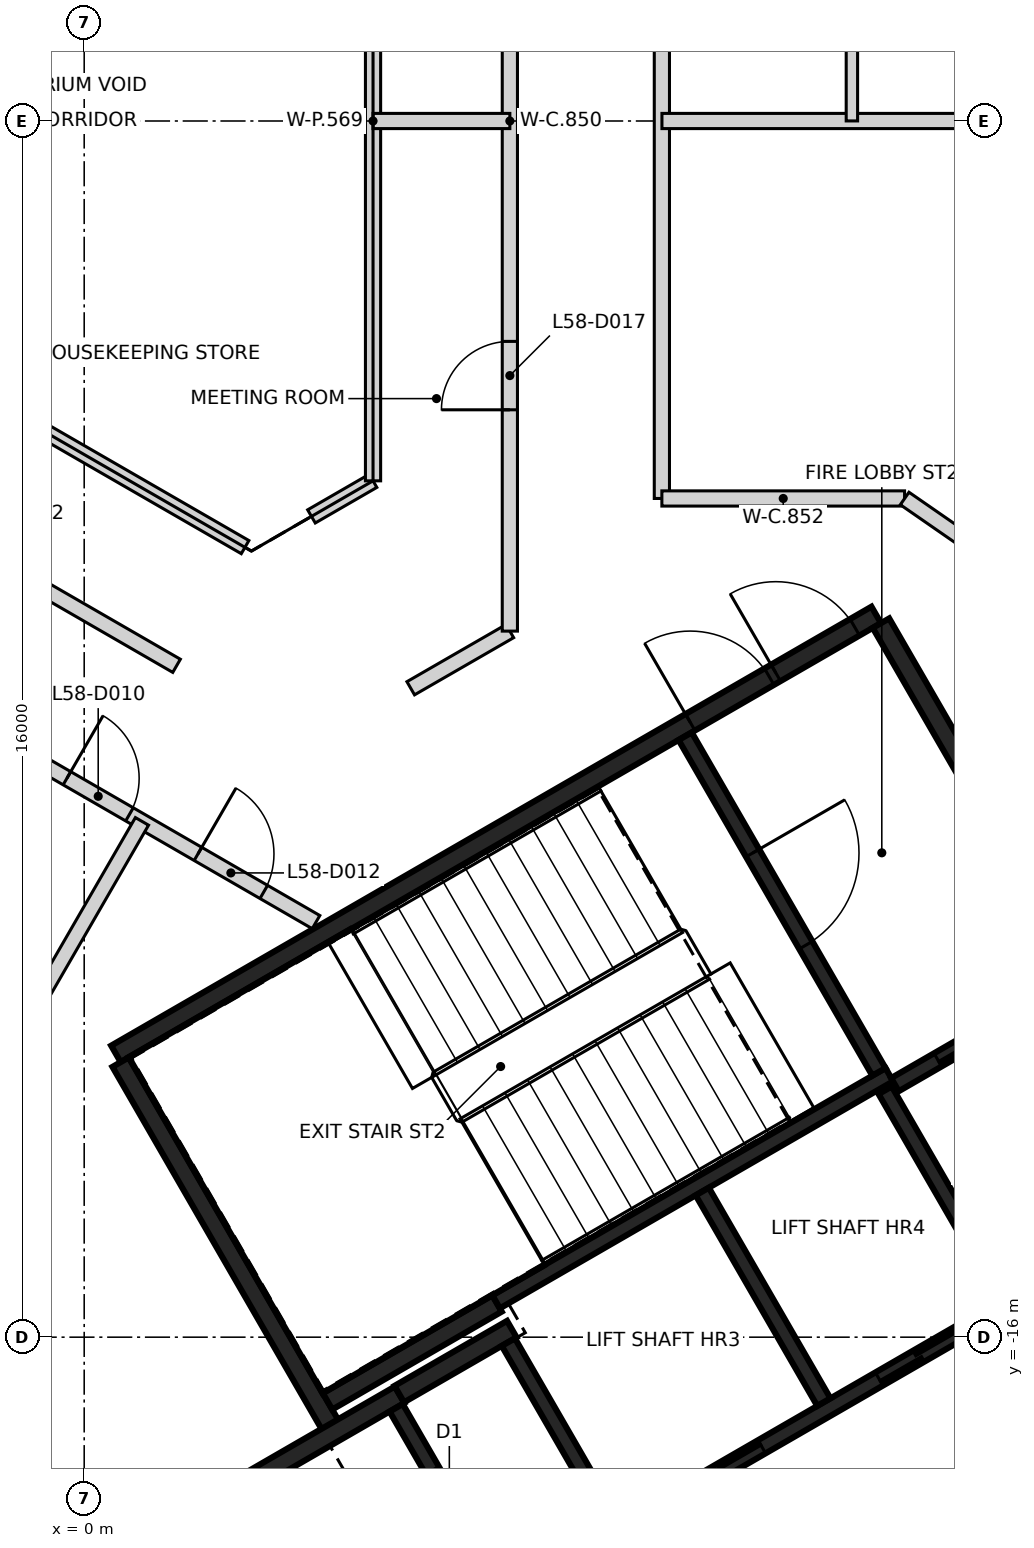
"""IFC4 building model, lengths in metres.
Left out: names, types, materials, properties, quantities, classifications, styles, units other than length and angle.
Written with IfcOpenShell. Run it as: python <this file> out.ifc"""

import sys

from ifc_helpers import new_model, si_unit, direction, frame, frame_2d, origin, place, context, subcontext, project, spatial, rectangle, extrude, element, fill, save


model = new_model("IFC4")
c1 = context("Model", 3, precision=1e-05, world=origin(), true_north=direction((0.0, 1.0)))
c2 = subcontext(c1, "Body", "Model", "MODEL_VIEW")
j1 = project(units=[si_unit("LENGTHUNIT", "METRE"), si_unit("PLANEANGLEUNIT", "RADIAN")], contexts=[c1])
p1 = place(None, origin())
s1 = spatial("IfcSite", under=j1, at=p1, CompositionType="ELEMENT")
p2 = place(p1, origin())
s2 = spatial("IfcBuilding", under=s1, at=p2, CompositionType="ELEMENT")
p3 = place(p2, frame((0.0, 0.0, 232.2)))
s3 = spatial("IfcBuildingStorey", under=s2, at=p3, CompositionType="ELEMENT", Elevation=232.2)
p4 = place(p3, frame((0.417, -12.273, 0.0), z_axis=(0.0, 0.0, 1.0), x_axis=(0.866021906294, 0.500006057782, 0.0)))
e1 = element("IfcWall", 1, at=p4, inside=s3, PredefinedType="SHEAR", context=c2, shape_type="SweptSolid", body=[
    extrude(rectangle(XDim=11.55, YDim=0.25, at=frame_2d((5.775, 0.0))), origin(), (0.0, 0.0, 1.0), 3.25),
])
p5 = place(p4, frame((10.025, 0.0, 0.0)))
e2 = element("IfcOpeningElement", 2, at=p5, cuts=e1, PredefinedType="OPENING", context=c2, shape_type="SweptSolid", body=[
    extrude(rectangle(XDim=1.2, YDim=2.1, at=frame_2d((0.6, 1.05))), frame((0.0, 0.135, 0.0), z_axis=(0.0, -1.0, 0.0), x_axis=(1.0, 0.0, 0.0)), (0.0, 0.0, 1.0), 0.27),
])
p6 = place(p4, frame((8.725, 0.0, 0.0)))
e3 = element("IfcOpeningElement", 3, at=p6, cuts=e1, PredefinedType="OPENING", context=c2, shape_type="SweptSolid", body=[
    extrude(rectangle(XDim=1.2, YDim=2.1, at=frame_2d((0.6, 1.05))), frame((0.0, 0.135, 0.0), z_axis=(0.0, -1.0, 0.0), x_axis=(1.0, 0.0, 0.0)), (0.0, 0.0, 1.0), 0.27),
])
p7 = place(p3, frame((16.133, -16.594, 0.0), z_axis=(0.0, 0.0, 1.0), x_axis=(-0.866022959057, -0.500004234368, 0.0)))
e4 = element("IfcWall", 4, at=p7, inside=s3, PredefinedType="SHEAR", context=c2, shape_type="SweptSolid", body=[
    extrude(rectangle(XDim=8.75, YDim=0.25, at=frame_2d((4.375, 0.0))), origin(), (0.0, 0.0, 1.0), 3.25),
])
p8 = place(p3, frame((3.235, -17.153, 0.0), z_axis=(0.0, 0.0, 1.0), x_axis=(-0.500008851346, 0.866020293397, 0.0)))
e5 = element("IfcWall", 5, at=p8, inside=s3, PredefinedType="SHEAR", context=c2, shape_type="SweptSolid", body=[
    extrude(rectangle(XDim=5.51, YDim=0.25, at=frame_2d((2.755, 0.0))), origin(), (0.0, 0.0, 1.0), 3.25),
])
p9 = place(p3, frame((10.483, -6.606, 0.0), z_axis=(0.0, 0.0, 1.0), x_axis=(0.49999885962, -0.866026062182, 0.0)))
e6 = element("IfcWall", 6, at=p9, inside=s3, PredefinedType="SHEAR", context=c2, shape_type="SweptSolid", body=[
    extrude(rectangle(XDim=5.225, YDim=0.25, at=frame_2d((2.612, 0.0))), origin(), (0.0, 0.0, 1.0), 3.25),
])
p10 = place(p3, frame((1.669, -18.19, 0.0), z_axis=(0.0, 0.0, 1.0), x_axis=(0.866042235819, 0.499970844928, 0.0)))
e7 = element("IfcWall", 7, at=p10, inside=s3, PredefinedType="SHEAR", context=c2, shape_type="SweptSolid", body=[
    extrude(rectangle(XDim=2.865, YDim=0.25, at=frame_2d((1.432, 0.0))), origin(), (0.0, 0.0, 1.0), 3.25),
])
p11 = place(p3, frame((5.431, -15.556, 0.0), z_axis=(0.0, 0.0, 1.0), x_axis=(-0.866022940537, -0.500004266446, 0.0)))
e8 = element("IfcWall", 8, at=p11, inside=s3, PredefinedType="SHEAR", context=c2, shape_type="SweptSolid", body=[
    extrude(rectangle(XDim=2.575, YDim=0.25, at=frame_2d((1.287, 0.0))), origin(), (0.0, 0.0, 1.0), 3.25),
])
p12 = place(p3, frame((4.145, -16.749, 0.0), z_axis=(0.0, 0.0, 1.0), x_axis=(0.866038183914, 0.499977863513, 0.0)))
e9 = element("IfcWall", 9, at=p12, inside=s3, PredefinedType="SHEAR", context=c2, shape_type="SweptSolid", body=[
    extrude(rectangle(XDim=1.71, YDim=0.25, at=frame_2d((0.855, 0.0))), origin(), (0.0, 0.0, 1.0), 3.25),
])
p13 = place(p3, frame((5.419, -15.534, 0.0), z_axis=(0.0, 0.0, 1.0), x_axis=(0.866029065029, 0.499993658486, 0.0)))
e10 = element("IfcWall", 10, at=p13, inside=s3, PredefinedType="SHEAR", context=c2, shape_type="SweptSolid", body=[
    extrude(rectangle(XDim=5.974, YDim=0.2, at=frame_2d((2.987, 0.0))), origin(), (0.0, 0.0, 1.0), 3.25),
])
p14 = place(p3, frame((7.01, -18.542, 0.0), z_axis=(0.0, 0.0, 1.0), x_axis=(0.866030299012, 0.499991521122, 0.0)))
e11 = element("IfcWall", 11, at=p14, inside=s3, PredefinedType="SHEAR", context=c2, shape_type="SweptSolid", body=[
    extrude(rectangle(XDim=6.1, YDim=0.2, at=frame_2d((3.05, 0.0))), origin(), (0.0, 0.0, 1.0), 3.25),
])
p15 = place(p14, frame((1.0, 0.0, 0.0)))
e12 = element("IfcOpeningElement", 12, at=p15, cuts=e11, PredefinedType="OPENING", context=c2, shape_type="SweptSolid", body=[
    extrude(rectangle(XDim=1.2, YDim=2.1, at=frame_2d((0.6, 1.05))), frame((0.0, 0.11, 0.0), z_axis=(0.0, -1.0, 0.0), x_axis=(1.0, 0.0, 0.0)), (0.0, 0.0, 1.0), 0.22),
])
p16 = place(p14, frame((3.982, 0.0, 0.0)))
e13 = element("IfcOpeningElement", 13, at=p16, cuts=e11, PredefinedType="OPENING", context=c2, shape_type="SweptSolid", body=[
    extrude(rectangle(XDim=1.2, YDim=2.1, at=frame_2d((0.6, 1.05))), frame((0.0, 0.11, 0.0), z_axis=(0.0, -1.0, 0.0), x_axis=(1.0, 0.0, 0.0)), (0.0, 0.0, 1.0), 0.22),
])
p17 = place(p3, frame((7.906, -8.094, 0.0), z_axis=(0.0, 0.0, 1.0), x_axis=(0.500027839223, -0.866009330205, 0.0)))
e14 = element("IfcWall", 14, at=p17, inside=s3, PredefinedType="SHEAR", context=c2, shape_type="SweptSolid", body=[
    extrude(rectangle(XDim=5.098, YDim=0.2, at=frame_2d((2.549, 0.0))), origin(), (0.0, 0.0, 1.0), 3.25),
])
p18 = place(p17, frame((1.774, 0.0, 0.0)))
e15 = element("IfcOpeningElement", 15, at=p18, cuts=e14, PredefinedType="OPENING", context=c2, shape_type="SweptSolid", body=[
    extrude(rectangle(XDim=1.4, YDim=2.1, at=frame_2d((0.7, 1.05))), frame((0.0, 0.11, 0.0), z_axis=(0.0, -1.0, 0.0), x_axis=(1.0, 0.0, 0.0)), (0.0, 0.0, 1.0), 0.22),
])
p19 = place(p3, frame((8.132, -14.084, 0.0), z_axis=(0.0, 0.0, 1.0), x_axis=(0.499997778408, -0.866026686418, 0.0)))
e16 = element("IfcWall", 16, at=p19, inside=s3, PredefinedType="SHEAR", context=c2, shape_type="SweptSolid", body=[
    extrude(rectangle(XDim=3.198, YDim=0.2, at=frame_2d((1.599, 0.0))), origin(), (0.0, 0.0, 1.0), 3.25),
])
p20 = place(p3, frame((5.503, -19.352, 0.0), z_axis=(0.0, 0.0, 1.0), x_axis=(-0.499986818241, 0.866033014143, 0.0)))
e17 = element("IfcWall", 17, at=p20, inside=s3, PredefinedType="SHEAR", context=c2, shape_type="SweptSolid", body=[
    extrude(rectangle(XDim=2.798, YDim=0.2, at=frame_2d((1.399, 0.0))), origin(), (0.0, 0.0, 1.0), 3.25),
])
p21 = place(p20, frame((0.949, 0.0, 0.0)))
e18 = element("IfcOpeningElement", 18, at=p21, cuts=e17, PredefinedType="OPENING", context=c2, shape_type="SweptSolid", body=[
    extrude(rectangle(XDim=0.9, YDim=2.1, at=frame_2d((0.45, 1.05))), frame((0.0, 0.11, 0.0), z_axis=(0.0, -1.0, 0.0), x_axis=(1.0, 0.0, 0.0)), (0.0, 0.0, 1.0), 0.22),
])
p22 = place(p3, frame((6.96, -18.455, 0.0), z_axis=(0.0, 0.0, 1.0), x_axis=(-0.499926705758, 0.866067716099, 0.0)))
e19 = element("IfcWall", 19, at=p22, inside=s3, PredefinedType="SHEAR", context=c2, shape_type="SweptSolid", body=[
    extrude(rectangle(XDim=2.759, YDim=0.2, at=frame_2d((1.38, 0.0))), origin(), (0.0, 0.0, 1.0), 3.25),
])
p23 = place(p3, frame((12.088, -15.437, 0.0), z_axis=(0.0, 0.0, 1.0), x_axis=(-0.500026960575, 0.86600983753, 0.0)))
e20 = element("IfcWall", 20, at=p23, inside=s3, PredefinedType="SHEAR", context=c2, shape_type="SweptSolid", body=[
    extrude(rectangle(XDim=3.1, YDim=0.2, at=frame_2d((1.55, 0.0))), origin(), (0.0, 0.0, 1.0), 3.25),
])
p24 = place(p3, frame((10.666, -12.678, 0.0), z_axis=(0.0, 0.0, 1.0), x_axis=(0.866018407898, 0.500012117035, 0.0)))
e21 = element("IfcWall", 21, at=p24, inside=s3, PredefinedType="SHEAR", context=c2, shape_type="SweptSolid", body=[
    extrude(rectangle(XDim=2.651, YDim=0.2, at=frame_2d((1.325, 0.0))), origin(), (0.0, 0.0, 1.0), 3.25),
])
p25 = place(p24, frame((0.652, 0.0, 0.0)))
e22 = element("IfcOpeningElement", 22, at=p25, cuts=e21, PredefinedType="OPENING", context=c2, shape_type="SweptSolid", body=[
    extrude(rectangle(XDim=1.3, YDim=2.1, at=frame_2d((0.65, 1.05))), frame((0.0, 0.11, 0.0), z_axis=(0.0, -1.0, 0.0), x_axis=(1.0, 0.0, 0.0)), (0.0, 0.0, 1.0), 0.22),
])
p26 = place(p3, frame((-8.612, -1.494, 0.0), z_axis=(0.0, 0.0, 1.0), x_axis=(0.866035468681, -0.499982566683, 0.0)))
e23 = element("IfcWall", 23, at=p26, inside=s3, PredefinedType="PARTITIONING", context=c2, shape_type="SweptSolid", body=[
    extrude(rectangle(XDim=11.348, YDim=0.2, at=frame_2d((5.674, 0.0))), origin(), (0.0, 0.0, 1.0), 3.25),
])
p27 = place(p26, frame((1.241, 0.0, 0.0)))
e24 = element("IfcOpeningElement", 24, at=p27, cuts=e23, PredefinedType="OPENING", context=c2, shape_type="SweptSolid", body=[
    extrude(rectangle(XDim=0.9, YDim=2.1, at=frame_2d((0.45, 1.05))), frame((0.0, 0.11, 0.0), z_axis=(0.0, -1.0, 0.0), x_axis=(1.0, 0.0, 0.0)), (0.0, 0.0, 1.0), 0.22),
])
p28 = place(p26, frame((6.903, 0.0, 0.0)))
e25 = element("IfcOpeningElement", 25, at=p28, cuts=e23, PredefinedType="OPENING", context=c2, shape_type="SweptSolid", body=[
    extrude(rectangle(XDim=0.9, YDim=2.1, at=frame_2d((0.45, 1.05))), frame((0.0, 0.11, 0.0), z_axis=(0.0, -1.0, 0.0), x_axis=(1.0, 0.0, 0.0)), (0.0, 0.0, 1.0), 0.22),
])
p29 = place(p3, frame((-8.153, -4.069, 0.0), z_axis=(0.0, 0.0, 1.0), x_axis=(0.865955522833, -0.500121017829, 0.0)))
e26 = element("IfcWall", 26, at=p29, inside=s3, PredefinedType="PARTITIONING", context=c2, shape_type="SweptSolid", body=[
    extrude(rectangle(XDim=12.937, YDim=0.2, at=frame_2d((6.469, 0.0))), origin(), (0.0, 0.0, 1.0), 3.25),
])
p30 = place(p29, frame((3.337, 0.0, 0.0)))
e27 = element("IfcOpeningElement", 27, at=p30, cuts=e26, PredefinedType="OPENING", context=c2, shape_type="SweptSolid", body=[
    extrude(rectangle(XDim=1.0, YDim=2.1, at=frame_2d((0.5, 1.05))), frame((0.0, 0.11, 0.0), z_axis=(0.0, -1.0, 0.0), x_axis=(1.0, 0.0, 0.0)), (0.0, 0.0, 1.0), 0.22),
])
p31 = place(p29, frame((9.153, 0.0, 0.0)))
e28 = element("IfcOpeningElement", 28, at=p31, cuts=e26, PredefinedType="OPENING", context=c2, shape_type="SweptSolid", body=[
    extrude(rectangle(XDim=0.95, YDim=2.1, at=frame_2d((0.475, 1.05))), frame((0.0, 0.11, 0.0), z_axis=(0.0, -1.0, 0.0), x_axis=(1.0, 0.0, 0.0)), (0.0, 0.0, 1.0), 0.22),
])
p32 = place(p29, frame((11.144, 0.0, 0.0)))
e29 = element("IfcOpeningElement", 29, at=p32, cuts=e26, PredefinedType="OPENING", context=c2, shape_type="SweptSolid", body=[
    extrude(rectangle(XDim=1.0, YDim=2.1, at=frame_2d((0.5, 1.05))), frame((0.0, 0.11, 0.0), z_axis=(0.0, -1.0, 0.0), x_axis=(1.0, 0.0, 0.0)), (0.0, 0.0, 1.0), 0.22),
])
p33 = place(p3, frame((4.296, -7.463, 0.0), z_axis=(0.0, 0.0, 1.0), x_axis=(0.86632054743, 0.499488447414, 0.0)))
e30 = element("IfcWall", 30, at=p33, inside=s3, PredefinedType="PARTITIONING", context=c2, shape_type="SweptSolid", body=[
    extrude(rectangle(XDim=1.505, YDim=0.2, at=frame_2d((0.753, 0.0))), origin(), (0.0, 0.0, 1.0), 3.25),
])
p34 = place(p3, frame((5.6, -6.711, 0.0), z_axis=(0.0, 0.0, 1.0), x_axis=(0.0, 1.0, 0.0)))
e31 = element("IfcWall", 31, at=p34, inside=s3, PredefinedType="PARTITIONING", context=c2, shape_type="SweptSolid", body=[
    extrude(rectangle(XDim=13.422, YDim=0.2, at=frame_2d((6.711, 0.0))), origin(), (0.0, 0.0, 1.0), 3.25),
])
p35 = place(p34, frame((2.912, 0.0, 0.0)))
e32 = element("IfcOpeningElement", 32, at=p35, cuts=e31, PredefinedType="OPENING", context=c2, shape_type="SweptSolid", body=[
    extrude(rectangle(XDim=0.9, YDim=2.1, at=frame_2d((0.45, 1.05))), frame((0.0, 0.11, 0.0), z_axis=(0.0, -1.0, 0.0), x_axis=(1.0, 0.0, 0.0)), (0.0, 0.0, 1.0), 0.22),
])
p36 = place(p34, frame((9.611, 0.0, 0.0)))
e33 = element("IfcOpeningElement", 33, at=p36, cuts=e31, PredefinedType="OPENING", context=c2, shape_type="SweptSolid", body=[
    extrude(rectangle(XDim=0.9, YDim=2.1, at=frame_2d((0.45, 1.05))), frame((0.0, 0.11, 0.0), z_axis=(0.0, -1.0, 0.0), x_axis=(1.0, 0.0, 0.0)), (0.0, 0.0, 1.0), 0.22),
])
p37 = place(p3, frame((7.6, -4.966, 0.0), z_axis=(0.0, 0.0, 1.0), x_axis=(0.0, 1.0, 0.0)))
e34 = element("IfcWall", 34, at=p37, inside=s3, PredefinedType="PARTITIONING", context=c2, shape_type="SweptSolid", body=[
    extrude(rectangle(XDim=12.878, YDim=0.2, at=frame_2d((6.439, 0.0))), origin(), (0.0, 0.0, 1.0), 3.25),
])
p38 = place(p37, frame((10.004, 0.0, 0.0)))
e35 = element("IfcOpeningElement", 35, at=p38, cuts=e34, PredefinedType="OPENING", context=c2, shape_type="SweptSolid", body=[
    extrude(rectangle(XDim=0.95, YDim=2.1, at=frame_2d((0.475, 1.05))), frame((0.0, 0.11, 0.0), z_axis=(0.0, -1.0, 0.0), x_axis=(1.0, 0.0, 0.0)), (0.0, 0.0, 1.0), 0.22),
])
p39 = place(p3, frame((7.6, -4.966, 0.0), z_axis=(0.0, 0.0, 1.0), x_axis=(1.0, 0.0, 0.0)))
e36 = element("IfcWall", 36, at=p39, inside=s3, PredefinedType="PARTITIONING", context=c2, shape_type="SweptSolid", body=[
    extrude(rectangle(XDim=3.193, YDim=0.2, at=frame_2d((1.596, 0.0))), origin(), (0.0, 0.0, 1.0), 3.25),
])
p40 = place(p3, frame((10.794, -4.966, 0.0), z_axis=(0.0, 0.0, 1.0), x_axis=(0.822266583859, -0.569102508401, 0.0)))
e37 = element("IfcWall", 37, at=p40, inside=s3, PredefinedType="PARTITIONING", context=c2, shape_type="SweptSolid", body=[
    extrude(rectangle(XDim=0.945, YDim=0.2, at=frame_2d((0.473, 0.0))), origin(), (0.0, 0.0, 1.0), 3.25),
])
p41 = place(p3, frame((-6.0, -0.924, 0.0), z_axis=(0.0, 0.0, 1.0), x_axis=(0.866223755075, -0.499656288007, 0.0)))
e38 = element("IfcWall", 38, at=p41, inside=s3, PredefinedType="PARTITIONING", context=c2, shape_type="SweptSolid", body=[
    extrude(rectangle(XDim=9.37, YDim=0.2, at=frame_2d((4.685, 0.0))), origin(), (0.0, 0.0, 1.0), 3.25),
])
p42 = place(p3, frame((-6.0, 0.924, 0.0), z_axis=(0.0, 0.0, 1.0), x_axis=(0.866012967051, 0.500021540435, 0.0)))
e39 = element("IfcWall", 39, at=p42, inside=s3, PredefinedType="PARTITIONING", context=c2, shape_type="SweptSolid", body=[
    extrude(rectangle(XDim=9.468, YDim=0.2, at=frame_2d((4.734, 0.0))), origin(), (0.0, 0.0, 1.0), 3.25),
])
p43 = place(p3, frame((-4.942, -19.089, 0.0), z_axis=(0.0, 0.0, 1.0), x_axis=(0.500021458202, 0.866013014531, 0.0)))
e40 = element("IfcWall", 40, at=p43, inside=s3, PredefinedType="PARTITIONING", context=c2, shape_type="SweptSolid", body=[
    extrude(rectangle(XDim=11.403, YDim=0.2, at=frame_2d((5.701, 0.0))), origin(), (0.0, 0.0, 1.0), 2.35),
])
p44 = place(p3, frame((2.99, -5.202, 0.0), z_axis=(0.0, 0.0, 1.0), x_axis=(0.865872609263, 0.500264554538, 0.0)))
e41 = element("IfcWall", 41, at=p44, inside=s3, PredefinedType="PARTITIONING", context=c2, shape_type="SweptSolid", body=[
    extrude(rectangle(XDim=0.936, YDim=0.2, at=frame_2d((0.468, 0.0))), origin(), (0.0, 0.0, 1.0), 3.25),
])
p45 = place(p3, frame((3.8, -4.734, 0.0), z_axis=(0.0, 0.0, 1.0), x_axis=(0.0, 1.0, 0.0)))
e42 = element("IfcWall", 42, at=p45, inside=s3, PredefinedType="PARTITIONING", context=c2, shape_type="SweptSolid", body=[
    extrude(rectangle(XDim=9.468, YDim=0.2, at=frame_2d((4.734, 0.0))), origin(), (0.0, 0.0, 1.0), 3.25),
])
p46 = place(p3, frame((3.8, 0.0, 0.0), z_axis=(0.0, 0.0, 1.0), x_axis=(1.0, 0.0, 0.0)))
e43 = element("IfcWall", 43, at=p46, inside=s3, PredefinedType="PARTITIONING", context=c2, shape_type="SweptSolid", body=[
    extrude(rectangle(XDim=1.8, YDim=0.2, at=frame_2d((0.9, 0.0))), origin(), (0.0, 0.0, 1.0), 3.25),
])
p47 = place(p3, frame((7.601, 0.0, 0.0), z_axis=(0.0, 0.0, 1.0), x_axis=(1.0, 0.0, 0.0)))
e44 = element("IfcWall", 44, at=p47, inside=s3, PredefinedType="PARTITIONING", context=c2, shape_type="SweptSolid", body=[
    extrude(rectangle(XDim=11.449, YDim=0.2, at=frame_2d((5.725, 0.0))), origin(), (0.0, 0.0, 1.0), 3.25),
])
p48 = place(p3, frame((10.1, 0.001, 0.0), z_axis=(0.0, 0.0, 1.0), x_axis=(0.0, 1.0, 0.0)))
e45 = element("IfcWall", 45, at=p48, inside=s3, PredefinedType="PARTITIONING", context=c2, shape_type="SweptSolid", body=[
    extrude(rectangle(XDim=2.397, YDim=0.15, at=frame_2d((1.198, 0.0))), origin(), (0.0, 0.0, 1.0), 3.25),
])
p49 = place(p25, origin())
e46 = element("IfcDoor", 46, at=p49, inside=s3, OperationType="SLIDING_TO_LEFT", PredefinedType="DOOR", context=c2, shape_type="SweptSolid", body=[
    extrude(rectangle(XDim=1.3, YDim=2.1, at=frame_2d((0.65, 1.05))), frame((0.0, 0.025, 0.0), z_axis=(0.0, -1.0, 0.0), x_axis=(1.0, 0.0, 0.0)), (0.0, 0.0, 1.0), 0.05),
])
fill(e22, e46)
p50 = place(p15, origin())
e47 = element("IfcDoor", 47, at=p50, inside=s3, OperationType="DOUBLE_DOOR_SLIDING", PredefinedType="DOOR", context=c2, shape_type="SweptSolid", body=[
    extrude(rectangle(XDim=1.2, YDim=2.1, at=frame_2d((0.6, 1.05))), frame((0.0, 0.025, 0.0), z_axis=(0.0, -1.0, 0.0), x_axis=(1.0, 0.0, 0.0)), (0.0, 0.0, 1.0), 0.05),
])
fill(e12, e47)
p51 = place(p16, origin())
e48 = element("IfcDoor", 48, at=p51, inside=s3, OperationType="DOUBLE_DOOR_SLIDING", PredefinedType="DOOR", context=c2, shape_type="SweptSolid", body=[
    extrude(rectangle(XDim=1.2, YDim=2.1, at=frame_2d((0.6, 1.05))), frame((0.0, 0.025, 0.0), z_axis=(0.0, -1.0, 0.0), x_axis=(1.0, 0.0, 0.0)), (0.0, 0.0, 1.0), 0.05),
])
fill(e13, e48)
p52 = place(p5, origin())
e49 = element("IfcDoor", 49, at=p52, inside=s3, OperationType="SINGLE_SWING_LEFT", PredefinedType="DOOR", context=c2, shape_type="SweptSolid", body=[
    extrude(rectangle(XDim=1.2, YDim=2.1, at=frame_2d((0.6, 1.05))), frame((0.0, 0.025, 0.0), z_axis=(0.0, -1.0, 0.0), x_axis=(1.0, 0.0, 0.0)), (0.0, 0.0, 1.0), 0.05),
])
fill(e2, e49)
p53 = place(p6, origin())
e50 = element("IfcDoor", 50, at=p53, inside=s3, OperationType="SINGLE_SWING_RIGHT", PredefinedType="DOOR", context=c2, shape_type="SweptSolid", body=[
    extrude(rectangle(XDim=1.2, YDim=2.1, at=frame_2d((0.6, 1.05))), frame((0.0, 0.025, 0.0), z_axis=(0.0, -1.0, 0.0), x_axis=(1.0, 0.0, 0.0)), (0.0, 0.0, 1.0), 0.05),
])
fill(e3, e50)
p54 = place(p18, origin())
e51 = element("IfcDoor", 51, at=p54, inside=s3, OperationType="SINGLE_SWING_LEFT", PredefinedType="DOOR", context=c2, shape_type="SweptSolid", body=[
    extrude(rectangle(XDim=1.4, YDim=2.1, at=frame_2d((0.7, 1.05))), frame((0.0, 0.025, 0.0), z_axis=(0.0, -1.0, 0.0), x_axis=(1.0, 0.0, 0.0)), (0.0, 0.0, 1.0), 0.05),
])
fill(e15, e51)
p55 = place(p31, frame((0.95, 0.0, 0.0), z_axis=(0.0, 0.0, 1.0), x_axis=(-1.0, 0.0, 0.0)))
e52 = element("IfcDoor", 52, at=p55, inside=s3, OperationType="SINGLE_SWING_LEFT", PredefinedType="DOOR", context=c2, shape_type="SweptSolid", body=[
    extrude(rectangle(XDim=0.95, YDim=2.1, at=frame_2d((0.475, 1.05))), frame((0.0, 0.025, 0.0), z_axis=(0.0, -1.0, 0.0), x_axis=(1.0, 0.0, 0.0)), (0.0, 0.0, 1.0), 0.05),
])
fill(e28, e52)
p56 = place(p32, frame((1.0, 0.0, 0.0), z_axis=(0.0, 0.0, 1.0), x_axis=(-1.0, 0.0, 0.0)))
e53 = element("IfcDoor", 53, at=p56, inside=s3, OperationType="SINGLE_SWING_LEFT", PredefinedType="DOOR", context=c2, shape_type="SweptSolid", body=[
    extrude(rectangle(XDim=1.0, YDim=2.1, at=frame_2d((0.5, 1.05))), frame((0.0, 0.025, 0.0), z_axis=(0.0, -1.0, 0.0), x_axis=(1.0, 0.0, 0.0)), (0.0, 0.0, 1.0), 0.05),
])
fill(e29, e53)
p57 = place(p35, origin())
e54 = element("IfcDoor", 54, at=p57, inside=s3, OperationType="SINGLE_SWING_LEFT", PredefinedType="DOOR", context=c2, shape_type="SweptSolid", body=[
    extrude(rectangle(XDim=0.9, YDim=2.1, at=frame_2d((0.45, 1.05))), frame((0.0, 0.025, 0.0), z_axis=(0.0, -1.0, 0.0), x_axis=(1.0, 0.0, 0.0)), (0.0, 0.0, 1.0), 0.05),
])
fill(e32, e54)
save(model, sys.argv[1])
